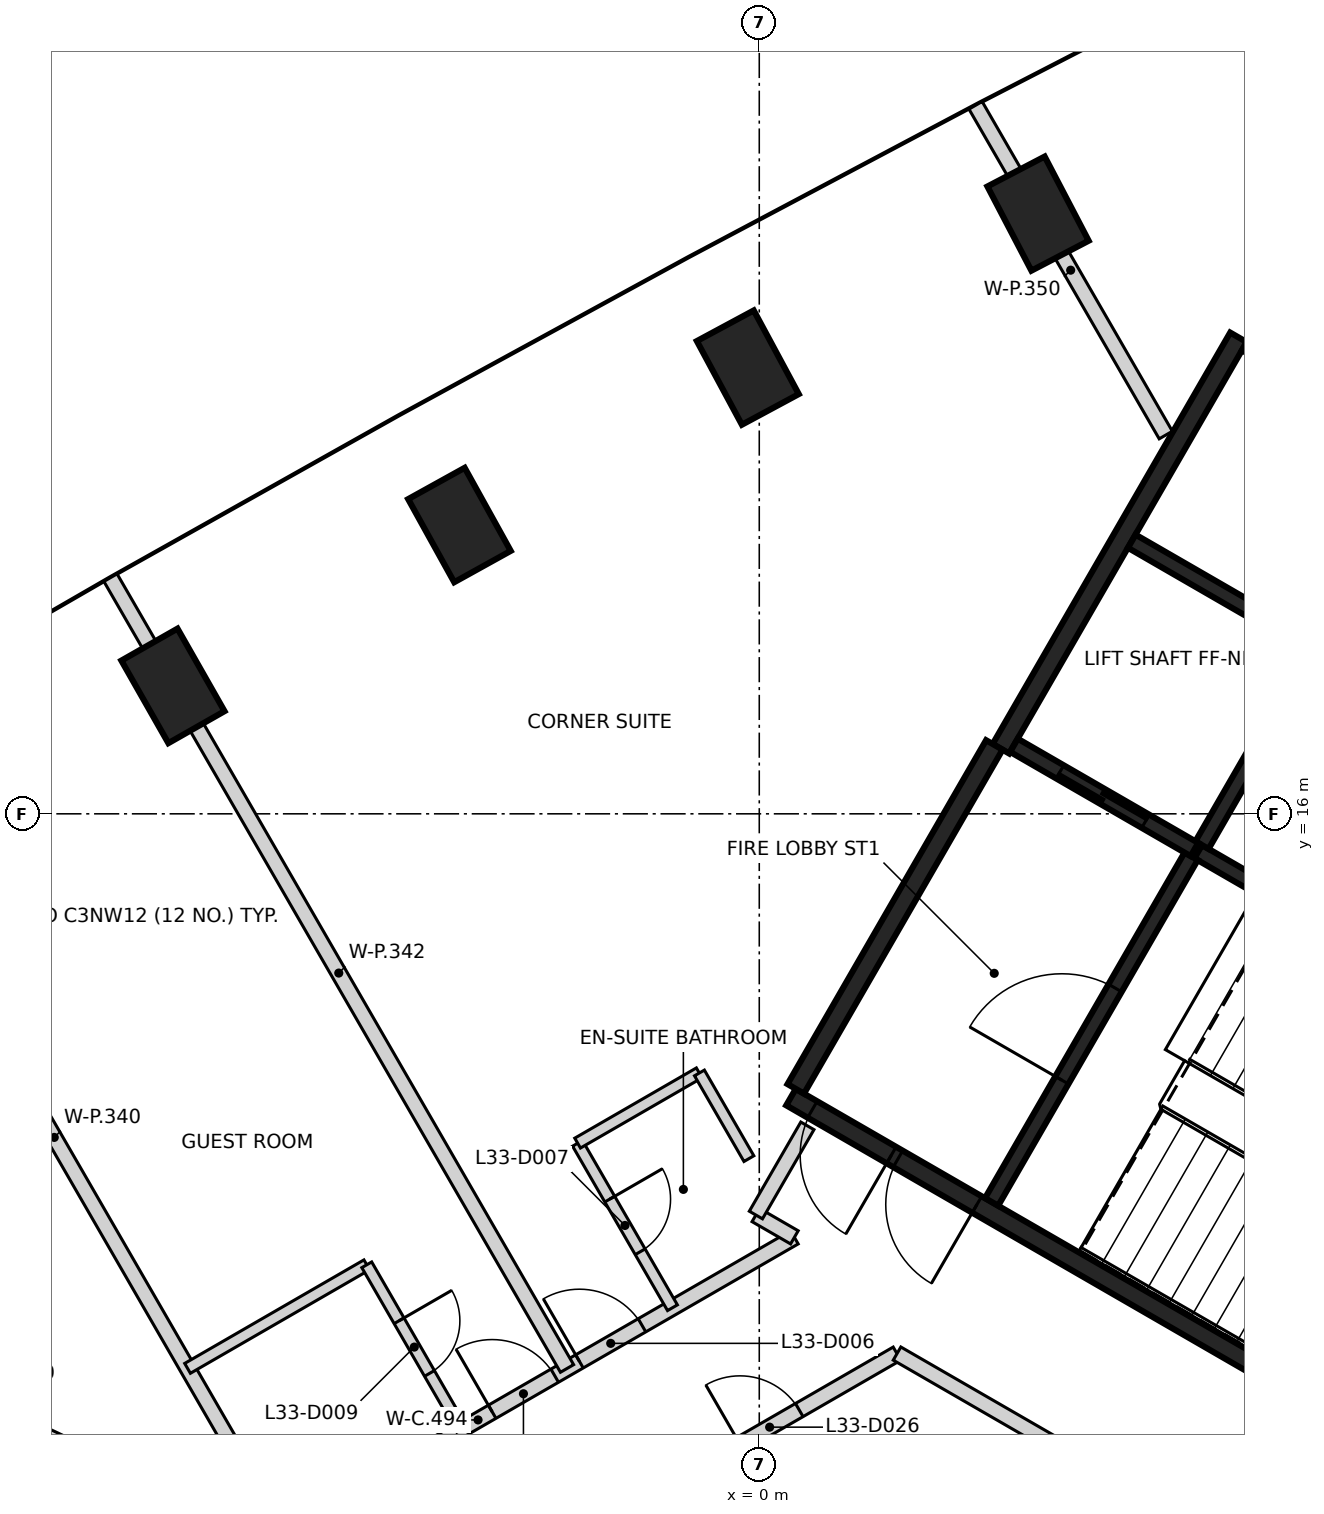
"""IFC4 building model, lengths in metres.
Left out: names, types, materials, properties, quantities, classifications, styles, units other than length and angle.
Written with IfcOpenShell. Run it as: python <this file> out.ifc"""

import sys

from ifc_helpers import new_model, si_unit, direction, frame, frame_2d, origin, origin_2d, place, context, subcontext, project, spatial, rectangle, extrude, element, fill, save


model = new_model("IFC4")
c1 = context("Model", 3, precision=1e-05, world=origin(), true_north=direction((0.0, 1.0)))
c2 = subcontext(c1, "Body", "Model", "MODEL_VIEW")
j1 = project(units=[si_unit("LENGTHUNIT", "METRE"), si_unit("PLANEANGLEUNIT", "RADIAN")], contexts=[c1])
p1 = place(None, origin())
s1 = spatial("IfcSite", under=j1, at=p1, CompositionType="ELEMENT")
p2 = place(p1, origin())
s2 = spatial("IfcBuilding", under=s1, at=p2, CompositionType="ELEMENT")
p3 = place(p2, frame((0.0, 0.0, 136.0)))
s3 = spatial("IfcBuildingStorey", under=s2, at=p3, CompositionType="ELEMENT", Elevation=136.0)
for number, where, z_axis, x_axis in (
    (1, (3.667, 23.896, -0.4), (0.0, 0.0, 1.0), (-0.463, 0.886, 0.0)),
    (2, (-0.151, 21.871, -0.4), (0.0, 0.0, 1.0), (-0.474, 0.881, 0.0)),
    (3, (-3.945, 19.8, -0.4), (0.0, 0.0, 1.0), (-0.485, 0.875, 0.0)),
    (4, (-7.714, 17.683, -0.4), (0.0, 0.0, 1.0), (-0.495, 0.869, 0.0)),
):
    element("IfcColumn", number, at=place(p3, frame(where, z_axis=z_axis, x_axis=x_axis)), inside=s3, PredefinedType="COLUMN", context=c2, shape_type="SweptSolid", body=[
        extrude(rectangle(XDim=1.25, YDim=0.85, at=origin_2d()), origin(), (0.0, 0.0, 1.0), 3.6),
    ])
p4 = place(p3, frame((10.42, 6.498, 0.0), z_axis=(0.0, 0.0, 1.0), x_axis=(-0.866021906294, 0.500006057782, 0.0)))
e5 = element("IfcWall", 5, at=p4, inside=s3, PredefinedType="SHEAR", context=c2, shape_type="SweptSolid", body=[
    extrude(rectangle(XDim=11.55, YDim=0.25, at=frame_2d((5.775, 0.0))), origin(), (0.0, 0.0, 1.0), 3.2),
])
p5 = place(p4, frame((10.025, 0.0, 0.0)))
e6 = element("IfcOpeningElement", 6, at=p5, cuts=e5, PredefinedType="OPENING", context=c2, shape_type="SweptSolid", body=[
    extrude(rectangle(XDim=1.2, YDim=2.1, at=frame_2d((0.6, 1.05))), frame((0.0, 0.135, 0.0), z_axis=(0.0, -1.0, 0.0), x_axis=(1.0, 0.0, 0.0)), (0.0, 0.0, 1.0), 0.27),
])
p6 = place(p4, frame((8.725, 0.0, 0.0)))
e7 = element("IfcOpeningElement", 7, at=p6, cuts=e5, PredefinedType="OPENING", context=c2, shape_type="SweptSolid", body=[
    extrude(rectangle(XDim=1.2, YDim=2.1, at=frame_2d((0.6, 1.05))), frame((0.0, 0.135, 0.0), z_axis=(0.0, -1.0, 0.0), x_axis=(1.0, 0.0, 0.0)), (0.0, 0.0, 1.0), 0.27),
])
p7 = place(p3, frame((3.179, 16.856, 0.0), z_axis=(0.0, 0.0, 1.0), x_axis=(0.500004234368, 0.866022959057, 0.0)))
e8 = element("IfcWall", 8, at=p7, inside=s3, PredefinedType="SHEAR", context=c2, shape_type="SweptSolid", body=[
    extrude(rectangle(XDim=6.25, YDim=0.25, at=frame_2d((3.125, 0.0))), origin(), (0.0, 0.0, 1.0), 3.2),
])
p8 = place(p3, frame((0.48, 12.381, 0.0), z_axis=(0.0, 0.0, 1.0), x_axis=(0.49999885962, 0.866026062182, 0.0)))
e9 = element("IfcWall", 9, at=p8, inside=s3, PredefinedType="SHEAR", context=c2, shape_type="SweptSolid", body=[
    extrude(rectangle(XDim=5.225, YDim=0.25, at=frame_2d((2.612, 0.0))), origin(), (0.0, 0.0, 1.0), 3.2),
])
p9 = place(p3, frame((6.413, 22.206, 0.0), z_axis=(0.0, 0.0, 1.0), x_axis=(0.866016279763, -0.500015802937, 0.0)))
e10 = element("IfcWall", 10, at=p9, inside=s3, PredefinedType="SHEAR", context=c2, shape_type="SweptSolid", body=[
    extrude(rectangle(XDim=1.849, YDim=0.25, at=frame_2d((0.925, 0.0))), origin(), (0.0, 0.0, 1.0), 3.2),
])
p10 = place(p3, frame((5.775, 15.502, 0.0), z_axis=(0.0, 0.0, 1.0), x_axis=(0.866020080793, -0.500009219579, 0.0)))
e11 = element("IfcWall", 11, at=p10, inside=s3, PredefinedType="SHEAR", context=c2, shape_type="SweptSolid", body=[
    extrude(rectangle(XDim=5.699, YDim=0.2, at=frame_2d((2.85, 0.0))), origin(), (0.0, 0.0, 1.0), 3.2),
])
p11 = place(p3, frame((3.057, 10.895, 0.0), z_axis=(0.0, 0.0, 1.0), x_axis=(0.499989418164, 0.866031513124, 0.0)))
e12 = element("IfcWall", 12, at=p11, inside=s3, PredefinedType="SHEAR", context=c2, shape_type="SweptSolid", body=[
    extrude(rectangle(XDim=5.251, YDim=0.2, at=frame_2d((2.625, 0.0))), origin(), (0.0, 0.0, 1.0), 3.2),
])
p12 = place(p11, frame((1.849, 0.0, 0.0)))
e13 = element("IfcOpeningElement", 13, at=p12, cuts=e12, PredefinedType="OPENING", context=c2, shape_type="SweptSolid", body=[
    extrude(rectangle(XDim=1.4, YDim=2.1, at=frame_2d((0.7, 1.05))), frame((0.0, 0.11, 0.0), z_axis=(0.0, -1.0, 0.0), x_axis=(1.0, 0.0, 0.0)), (0.0, 0.0, 1.0), 0.22),
])
p13 = place(p3, frame((7.199, 17.97, 0.0), z_axis=(0.0, 0.0, 1.0), x_axis=(-0.499968400327, -0.866043647095, 0.0)))
e14 = element("IfcWall", 14, at=p13, inside=s3, PredefinedType="SHEAR", context=c2, shape_type="SweptSolid", body=[
    extrude(rectangle(XDim=2.75, YDim=0.2, at=frame_2d((1.375, 0.0))), origin(), (0.0, 0.0, 1.0), 3.2),
])
p14 = place(p3, frame((5.725, 15.531, 0.0), z_axis=(0.0, 0.0, 1.0), x_axis=(-0.866037306777, 0.499979382845, 0.0)))
e15 = element("IfcWall", 15, at=p14, inside=s3, PredefinedType="SHEAR", context=c2, shape_type="SweptSolid", body=[
    extrude(rectangle(XDim=2.742, YDim=0.2, at=frame_2d((1.371, 0.0))), origin(), (0.0, 0.0, 1.0), 3.2),
])
p15 = place(p14, frame((0.743, 0.0, 0.0)))
e16 = element("IfcOpeningElement", 16, at=p15, cuts=e15, PredefinedType="OPENING", context=c2, shape_type="SweptSolid", body=[
    extrude(rectangle(XDim=1.3, YDim=2.1, at=frame_2d((0.65, 1.05))), frame((0.0, 0.11, 0.0), z_axis=(0.0, -1.0, 0.0), x_axis=(1.0, 0.0, 0.0)), (0.0, 0.0, 1.0), 0.22),
])
p16 = place(p3, frame((4.901, 19.586, 0.0), z_axis=(0.0, 0.0, 1.0), x_axis=(0.866022890907, -0.500004352405, 0.0)))
e17 = element("IfcWall", 17, at=p16, inside=s3, PredefinedType="SHEAR", context=c2, shape_type="SweptSolid", body=[
    extrude(rectangle(XDim=2.799, YDim=0.2, at=frame_2d((1.399, 0.0))), origin(), (0.0, 0.0, 1.0), 3.2),
])
p17 = place(p3, frame((-10.141, 8.176, 0.0), z_axis=(0.0, 0.0, 1.0), x_axis=(0.903904169039, -0.427735026849, 0.0)))
e18 = element("IfcWall", 18, at=p17, inside=s3, PredefinedType="PARTITIONING", context=c2, shape_type="SweptSolid", body=[
    extrude(rectangle(XDim=1.225, YDim=0.2, at=frame_2d((0.612, 0.0))), origin(), (0.0, 0.0, 1.0), 3.2),
])
p18 = place(p3, frame((-8.613, 2.881, 0.0), z_axis=(0.0, 0.0, 1.0), x_axis=(0.866103179807, 0.499865263774, 0.0)))
e19 = element("IfcWall", 19, at=p18, inside=s3, PredefinedType="PARTITIONING", context=c2, shape_type="SweptSolid", body=[
    extrude(rectangle(XDim=12.036, YDim=0.2, at=frame_2d((6.018, 0.0))), origin(), (0.0, 0.0, 1.0), 3.2),
])
p19 = place(p18, frame((9.652, 0.0, 0.0)))
e20 = element("IfcOpeningElement", 20, at=p19, cuts=e19, PredefinedType="OPENING", context=c2, shape_type="SweptSolid", body=[
    extrude(rectangle(XDim=0.9, YDim=2.1, at=frame_2d((0.45, 1.05))), frame((0.0, 0.11, 0.0), z_axis=(0.0, -1.0, 0.0), x_axis=(1.0, 0.0, 0.0)), (0.0, 0.0, 1.0), 0.22),
])
p20 = place(p18, frame((3.646, 0.0, 0.0)))
e21 = element("IfcOpeningElement", 21, at=p20, cuts=e19, PredefinedType="OPENING", context=c2, shape_type="SweptSolid", body=[
    extrude(rectangle(XDim=0.9, YDim=2.1, at=frame_2d((0.45, 1.05))), frame((0.0, 0.11, 0.0), z_axis=(0.0, -1.0, 0.0), x_axis=(1.0, 0.0, 0.0)), (0.0, 0.0, 1.0), 0.22),
])
p21 = place(p3, frame((-7.862, 5.624, 0.0), z_axis=(0.0, 0.0, 1.0), x_axis=(0.866109024618, 0.499855136491, 0.0)))
e22 = element("IfcWall", 22, at=p21, inside=s3, PredefinedType="PARTITIONING", context=c2, shape_type="SweptSolid", body=[
    extrude(rectangle(XDim=9.61, YDim=0.2, at=frame_2d((4.805, 0.0))), origin(), (0.0, 0.0, 1.0), 3.2),
])
p22 = place(p21, frame((6.345, 0.0, 0.0)))
e23 = element("IfcOpeningElement", 23, at=p22, cuts=e22, PredefinedType="OPENING", context=c2, shape_type="SweptSolid", body=[
    extrude(rectangle(XDim=0.95, YDim=2.1, at=frame_2d((0.475, 1.05))), frame((0.0, 0.11, 0.0), z_axis=(0.0, -1.0, 0.0), x_axis=(1.0, 0.0, 0.0)), (0.0, 0.0, 1.0), 0.22),
])
p23 = place(p21, frame((5.02, 0.0, 0.0)))
e24 = element("IfcOpeningElement", 24, at=p23, cuts=e22, PredefinedType="OPENING", context=c2, shape_type="SweptSolid", body=[
    extrude(rectangle(XDim=0.95, YDim=2.1, at=frame_2d((0.475, 1.05))), frame((0.0, 0.11, 0.0), z_axis=(0.0, -1.0, 0.0), x_axis=(1.0, 0.0, 0.0)), (0.0, 0.0, 1.0), 0.22),
])
p24 = place(p3, frame((-0.045, 10.721, 0.0), z_axis=(0.0, 0.0, 1.0), x_axis=(0.865768710998, -0.500444341617, 0.0)))
e25 = element("IfcWall", 25, at=p24, inside=s3, PredefinedType="PARTITIONING", context=c2, shape_type="SweptSolid", body=[
    extrude(rectangle(XDim=0.585, YDim=0.2, at=frame_2d((0.293, 0.0))), origin(), (0.0, 0.0, 1.0), 3.2),
])
p25 = place(p3, frame((-0.044, 10.722, 0.0), z_axis=(0.0, 0.0, 1.0), x_axis=(0.500034408226, 0.866005537274, 0.0)))
e26 = element("IfcWall", 26, at=p25, inside=s3, PredefinedType="PARTITIONING", context=c2, shape_type="SweptSolid", body=[
    extrude(rectangle(XDim=1.355, YDim=0.2, at=frame_2d((0.677, 0.0))), origin(), (0.0, 0.0, 1.0), 3.2),
])
p26 = place(p3, frame((1.813, 8.899, 0.0), z_axis=(0.0, 0.0, 1.0), x_axis=(0.865957732194, -0.50011719232, 0.0)))
e27 = element("IfcWall", 27, at=p26, inside=s3, PredefinedType="PARTITIONING", context=c2, shape_type="SweptSolid", body=[
    extrude(rectangle(XDim=2.891, YDim=0.2, at=frame_2d((1.445, 0.0))), origin(), (0.0, 0.0, 1.0), 2.3),
])
p27 = place(p3, frame((-12.279, 16.946, 0.0), z_axis=(0.0, 0.0, 1.0), x_axis=(0.499902454835, -0.866081714187, 0.0)))
e28 = element("IfcWall", 28, at=p27, inside=s3, PredefinedType="PARTITIONING", context=c2, shape_type="SweptSolid", body=[
    extrude(rectangle(XDim=12.015, YDim=0.2, at=frame_2d((6.008, 0.0))), origin(), (0.0, 0.0, 1.0), 3.2),
])
p28 = place(p3, frame((-8.535, 19.107, 0.0), z_axis=(0.0, 0.0, 1.0), x_axis=(0.499972843048, -0.86604108229, 0.0)))
e29 = element("IfcWall", 29, at=p28, inside=s3, PredefinedType="PARTITIONING", context=c2, shape_type="SweptSolid", body=[
    extrude(rectangle(XDim=12.013, YDim=0.2, at=frame_2d((6.007, 0.0))), origin(), (0.0, 0.0, 1.0), 3.2),
])
p29 = place(p3, frame((2.845, 25.321, 0.0), z_axis=(0.0, 0.0, 1.0), x_axis=(0.499730893997, -0.86618071647, 0.0)))
e30 = element("IfcWall", 30, at=p29, inside=s3, PredefinedType="PARTITIONING", context=c2, shape_type="SweptSolid", body=[
    extrude(rectangle(XDim=5.008, YDim=0.2, at=frame_2d((2.504, 0.0))), origin(), (0.0, 0.0, 1.0), 3.2),
])
p30 = place(p3, frame((-7.522, 8.704, 0.0), z_axis=(0.0, 0.0, 1.0), x_axis=(0.865972067821, 0.500092369221, 0.0)))
e31 = element("IfcWall", 31, at=p30, inside=s3, PredefinedType="PARTITIONING", context=c2, shape_type="SweptSolid", body=[
    extrude(rectangle(XDim=2.723, YDim=0.15, at=frame_2d((1.362, 0.0))), origin(), (0.0, 0.0, 1.0), 3.2),
])
p31 = place(p3, frame((-5.164, 10.067, 0.0), z_axis=(0.0, 0.0, 1.0), x_axis=(0.500046524342, -0.865998541277, 0.0)))
e32 = element("IfcWall", 32, at=p31, inside=s3, PredefinedType="PARTITIONING", context=c2, shape_type="SweptSolid", body=[
    extrude(rectangle(XDim=2.5, YDim=0.15, at=frame_2d((1.25, 0.0))), origin(), (0.0, 0.0, 1.0), 3.2),
])
p32 = place(p31, frame((0.85, 0.0, 0.0)))
e33 = element("IfcOpeningElement", 33, at=p32, cuts=e32, PredefinedType="OPENING", context=c2, shape_type="SweptSolid", body=[
    extrude(rectangle(XDim=0.8, YDim=2.1, at=frame_2d((0.4, 1.05))), frame((0.0, 0.085, 0.0), z_axis=(0.0, -1.0, 0.0), x_axis=(1.0, 0.0, 0.0)), (0.0, 0.0, 1.0), 0.17),
])
p33 = place(p3, frame((-2.391, 11.665, 0.0), z_axis=(0.0, 0.0, 1.0), x_axis=(0.500049599607, -0.865996765544, 0.0)))
e34 = element("IfcWall", 34, at=p33, inside=s3, PredefinedType="PARTITIONING", context=c2, shape_type="SweptSolid", body=[
    extrude(rectangle(XDim=2.498, YDim=0.15, at=frame_2d((1.249, 0.0))), origin(), (0.0, 0.0, 1.0), 3.2),
])
p34 = place(p33, frame((0.848, 0.0, 0.0)))
e35 = element("IfcOpeningElement", 35, at=p34, cuts=e34, PredefinedType="OPENING", context=c2, shape_type="SweptSolid", body=[
    extrude(rectangle(XDim=0.8, YDim=2.1, at=frame_2d((0.4, 1.05))), frame((0.0, 0.085, 0.0), z_axis=(0.0, -1.0, 0.0), x_axis=(1.0, 0.0, 0.0)), (0.0, 0.0, 1.0), 0.17),
])
p35 = place(p3, frame((-2.39, 11.668, 0.0), z_axis=(0.0, 0.0, 1.0), x_axis=(0.865932482239, 0.500160910312, 0.0)))
e36 = element("IfcWall", 36, at=p35, inside=s3, PredefinedType="PARTITIONING", context=c2, shape_type="SweptSolid", body=[
    extrude(rectangle(XDim=1.848, YDim=0.15, at=frame_2d((0.924, 0.0))), origin(), (0.0, 0.0, 1.0), 3.2),
])
p36 = place(p3, frame((-0.787, 12.591, 0.0), z_axis=(0.0, 0.0, 1.0), x_axis=(0.499749509877, -0.866169976031, 0.0)))
e37 = element("IfcWall", 37, at=p36, inside=s3, PredefinedType="PARTITIONING", context=c2, shape_type="SweptSolid", body=[
    extrude(rectangle(XDim=1.302, YDim=0.15, at=frame_2d((0.651, 0.0))), origin(), (0.0, 0.0, 1.0), 3.2),
])
p37 = place(p15, origin())
e38 = element("IfcDoor", 38, at=p37, inside=s3, OperationType="SLIDING_TO_LEFT", PredefinedType="DOOR", context=c2, shape_type="SweptSolid", body=[
    extrude(rectangle(XDim=1.3, YDim=2.1, at=frame_2d((0.65, 1.05))), frame((0.0, 0.025, 0.0), z_axis=(0.0, -1.0, 0.0), x_axis=(1.0, 0.0, 0.0)), (0.0, 0.0, 1.0), 0.05),
])
fill(e16, e38)
p38 = place(p5, origin())
e39 = element("IfcDoor", 39, at=p38, inside=s3, OperationType="SINGLE_SWING_LEFT", PredefinedType="DOOR", context=c2, shape_type="SweptSolid", body=[
    extrude(rectangle(XDim=1.2, YDim=2.1, at=frame_2d((0.6, 1.05))), frame((0.0, 0.025, 0.0), z_axis=(0.0, -1.0, 0.0), x_axis=(1.0, 0.0, 0.0)), (0.0, 0.0, 1.0), 0.05),
])
fill(e6, e39)
p39 = place(p6, origin())
e40 = element("IfcDoor", 40, at=p39, inside=s3, OperationType="SINGLE_SWING_RIGHT", PredefinedType="DOOR", context=c2, shape_type="SweptSolid", body=[
    extrude(rectangle(XDim=1.2, YDim=2.1, at=frame_2d((0.6, 1.05))), frame((0.0, 0.025, 0.0), z_axis=(0.0, -1.0, 0.0), x_axis=(1.0, 0.0, 0.0)), (0.0, 0.0, 1.0), 0.05),
])
fill(e7, e40)
p40 = place(p12, origin())
e41 = element("IfcDoor", 41, at=p40, inside=s3, OperationType="SINGLE_SWING_LEFT", PredefinedType="DOOR", context=c2, shape_type="SweptSolid", body=[
    extrude(rectangle(XDim=1.4, YDim=2.1, at=frame_2d((0.7, 1.05))), frame((0.0, 0.025, 0.0), z_axis=(0.0, -1.0, 0.0), x_axis=(1.0, 0.0, 0.0)), (0.0, 0.0, 1.0), 0.05),
])
fill(e13, e41)
p41 = place(p22, origin())
e42 = element("IfcDoor", 42, at=p41, inside=s3, OperationType="SINGLE_SWING_LEFT", PredefinedType="DOOR", context=c2, shape_type="SweptSolid", body=[
    extrude(rectangle(XDim=0.95, YDim=2.1, at=frame_2d((0.475, 1.05))), frame((0.0, 0.025, 0.0), z_axis=(0.0, -1.0, 0.0), x_axis=(1.0, 0.0, 0.0)), (0.0, 0.0, 1.0), 0.05),
])
fill(e23, e42)
p42 = place(p34, origin())
e43 = element("IfcDoor", 43, at=p42, inside=s3, OperationType="SINGLE_SWING_LEFT", PredefinedType="DOOR", context=c2, shape_type="SweptSolid", body=[
    extrude(rectangle(XDim=0.8, YDim=2.1, at=frame_2d((0.4, 1.05))), frame((0.0, 0.025, 0.0), z_axis=(0.0, -1.0, 0.0), x_axis=(1.0, 0.0, 0.0)), (0.0, 0.0, 1.0), 0.05),
])
fill(e35, e43)
p43 = place(p23, origin())
e44 = element("IfcDoor", 44, at=p43, inside=s3, OperationType="SINGLE_SWING_LEFT", PredefinedType="DOOR", context=c2, shape_type="SweptSolid", body=[
    extrude(rectangle(XDim=0.95, YDim=2.1, at=frame_2d((0.475, 1.05))), frame((0.0, 0.025, 0.0), z_axis=(0.0, -1.0, 0.0), x_axis=(1.0, 0.0, 0.0)), (0.0, 0.0, 1.0), 0.05),
])
fill(e24, e44)
p44 = place(p32, frame((0.8, 0.0, 0.0), z_axis=(0.0, 0.0, 1.0), x_axis=(-1.0, 0.0, 0.0)))
e45 = element("IfcDoor", 45, at=p44, inside=s3, OperationType="SINGLE_SWING_LEFT", PredefinedType="DOOR", context=c2, shape_type="SweptSolid", body=[
    extrude(rectangle(XDim=0.8, YDim=2.1, at=frame_2d((0.4, 1.05))), frame((0.0, 0.025, 0.0), z_axis=(0.0, -1.0, 0.0), x_axis=(1.0, 0.0, 0.0)), (0.0, 0.0, 1.0), 0.05),
])
fill(e33, e45)
p45 = place(p19, frame((0.9, 0.0, 0.0), z_axis=(0.0, 0.0, 1.0), x_axis=(-1.0, 0.0, 0.0)))
e46 = element("IfcDoor", 46, at=p45, inside=s3, OperationType="SINGLE_SWING_LEFT", PredefinedType="DOOR", context=c2, shape_type="SweptSolid", body=[
    extrude(rectangle(XDim=0.9, YDim=2.1, at=frame_2d((0.45, 1.05))), frame((0.0, 0.025, 0.0), z_axis=(0.0, -1.0, 0.0), x_axis=(1.0, 0.0, 0.0)), (0.0, 0.0, 1.0), 0.05),
])
fill(e20, e46)
save(model, sys.argv[1])
